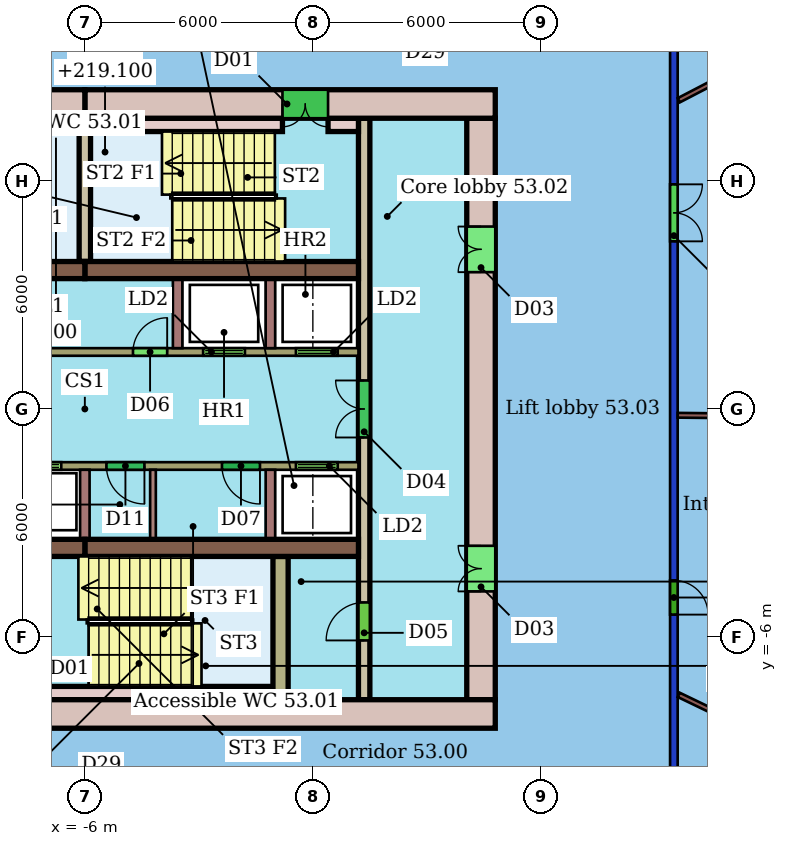
"""IFC4 building model, lengths in metres.
Left out: names, types, materials, properties, quantities, classifications, styles, units other than length and angle.
Written with IfcOpenShell. Run it as: python <this file> out.ifc"""

import sys

from ifc_helpers import new_model, si_unit, direction, frame, frame_2d, origin, place, context, subcontext, project, spatial, rectangle, extrude, element, fill, save


model = new_model("IFC4")
c1 = context("Model", 3, precision=1e-05, world=origin(), true_north=direction((0.0, 1.0)))
c2 = subcontext(c1, "Body", "Model", "MODEL_VIEW")
j1 = project(units=[si_unit("LENGTHUNIT", "METRE"), si_unit("PLANEANGLEUNIT", "RADIAN")], contexts=[c1])
p1 = place(None, origin())
s1 = spatial("IfcSite", under=j1, at=p1, CompositionType="ELEMENT")
p2 = place(p1, origin())
s2 = spatial("IfcBuilding", under=s1, at=p2, CompositionType="ELEMENT")
p3 = place(p2, frame((0.0, 0.0, 217.3)))
s3 = spatial("IfcBuildingStorey", under=s2, at=p3, CompositionType="ELEMENT", Elevation=217.3)
p4 = place(p3, frame((9.5, 10.4, 0.0), z_axis=(0.0, 0.0, 1.0), x_axis=(0.0, -1.0, 0.0)))
e1 = element("IfcWall", 1, at=p4, inside=s3, PredefinedType="PARTITIONING", context=c2, shape_type="SweptSolid", body=[
    extrude(rectangle(XDim=20.8, YDim=0.2, at=frame_2d((10.4, 0.0))), origin(), (0.0, 0.0, 1.0), 3.05),
])
p5 = place(p4, frame((14.911, 0.0, 0.0)))
e2 = element("IfcOpeningElement", 2, at=p5, cuts=e1, PredefinedType="OPENING", context=c2, shape_type="SweptSolid", body=[
    extrude(rectangle(XDim=0.9, YDim=2.1, at=frame_2d((0.45, 1.05))), frame((0.0, 0.11, 0.0), z_axis=(0.0, -1.0, 0.0), x_axis=(1.0, 0.0, 0.0)), (0.0, 0.0, 1.0), 0.22),
])
p6 = place(p4, frame((4.489, 0.0, 0.0)))
e3 = element("IfcOpeningElement", 3, at=p6, cuts=e1, PredefinedType="OPENING", context=c2, shape_type="SweptSolid", body=[
    extrude(rectangle(XDim=1.5, YDim=2.1, at=frame_2d((0.75, 1.05))), frame((0.0, 0.11, 0.0), z_axis=(0.0, -1.0, 0.0), x_axis=(1.0, 0.0, 0.0)), (0.0, 0.0, 1.0), 0.22),
])
p7 = place(p3, frame((14.057, -9.655, 0.0), z_axis=(0.0, 0.0, 1.0), x_axis=(-0.901030422523, 0.433755896431, 0.0)))
e4 = element("IfcWall", 4, at=p7, inside=s3, PredefinedType="PARTITIONING", context=c2, shape_type="SweptSolid", body=[
    extrude(rectangle(XDim=4.917, YDim=0.125, at=frame_2d((2.458, 0.0))), origin(), (0.0, 0.0, 1.0), 3.45),
])
p8 = place(p3, frame((17.84, -0.253, 0.0), z_axis=(0.0, 0.0, 1.0), x_axis=(-0.999943746201, 0.0106068107, 0.0)))
e5 = element("IfcWall", 5, at=p8, inside=s3, PredefinedType="PARTITIONING", context=c2, shape_type="SweptSolid", body=[
    extrude(rectangle(XDim=8.24, YDim=0.125, at=frame_2d((4.12, 0.0))), origin(), (0.0, 0.0, 1.0), 3.45),
])
p9 = place(p3, frame((17.207, 12.061, 0.0), z_axis=(0.0, 0.0, 1.0), x_axis=(-0.887319286248, -0.461155596574, 0.0)))
e6 = element("IfcWall", 6, at=p9, inside=s3, PredefinedType="PARTITIONING", context=c2, shape_type="SweptSolid", body=[
    extrude(rectangle(XDim=8.54, YDim=0.125, at=frame_2d((4.27, 0.0))), origin(), (0.0, 0.0, 1.0), 3.45),
])
p10 = place(p3, frame((4.8, 8.025, 0.0), z_axis=(0.0, 0.0, 1.0), x_axis=(-1.0, 0.0, 0.0)))
e7 = element("IfcWall", 7, at=p10, inside=s3, PredefinedType="SHEAR", context=c2, shape_type="SweptSolid", body=[
    extrude(rectangle(XDim=10.8, YDim=0.75, at=frame_2d((5.4, 0.0))), origin(), (0.0, 0.0, 1.0), 3.3),
])
p11 = place(p10, frame((4.4, 0.0, 0.0)))
e8 = element("IfcOpeningElement", 8, at=p11, cuts=e7, PredefinedType="OPENING", context=c2, shape_type="SweptSolid", body=[
    extrude(rectangle(XDim=1.2, YDim=2.1, at=frame_2d((0.6, 1.05))), frame((0.0, 0.385, 0.0), z_axis=(0.0, -1.0, 0.0), x_axis=(1.0, 0.0, 0.0)), (0.0, 0.0, 1.0), 0.77),
])
p12 = place(p3, frame((-6.0, 8.025, 0.0), z_axis=(0.0, 0.0, 1.0), x_axis=(-1.0, 0.0, 0.0)))
e9 = element("IfcWall", 9, at=p12, inside=s3, PredefinedType="SHEAR", context=c2, shape_type="SweptSolid", body=[
    extrude(rectangle(XDim=10.8, YDim=0.75, at=frame_2d((5.4, 0.0))), origin(), (0.0, 0.0, 1.0), 3.3),
])
p13 = place(p12, frame((5.2, 0.0, 0.0)))
e10 = element("IfcOpeningElement", 10, at=p13, cuts=e9, PredefinedType="OPENING", context=c2, shape_type="SweptSolid", body=[
    extrude(rectangle(XDim=1.2, YDim=2.1, at=frame_2d((0.6, 1.05))), frame((0.0, 0.385, 0.0), z_axis=(0.0, -1.0, 0.0), x_axis=(1.0, 0.0, 0.0)), (0.0, 0.0, 1.0), 0.77),
])
p14 = place(p3, frame((-16.8, -8.025, 0.0), z_axis=(0.0, 0.0, 1.0), x_axis=(1.0, 0.0, 0.0)))
e11 = element("IfcWall", 11, at=p14, inside=s3, PredefinedType="SHEAR", context=c2, shape_type="SweptSolid", body=[
    extrude(rectangle(XDim=21.6, YDim=0.75, at=frame_2d((10.8, 0.0))), origin(), (0.0, 0.0, 1.0), 3.3),
])
p15 = place(p14, frame((4.8, 0.0, 0.0)))
e12 = element("IfcOpeningElement", 12, at=p15, cuts=e11, PredefinedType="OPENING", context=c2, shape_type="SweptSolid", body=[
    extrude(rectangle(XDim=1.2, YDim=2.1, at=frame_2d((0.6, 1.05))), frame((0.0, 0.385, 0.0), z_axis=(0.0, -1.0, 0.0), x_axis=(1.0, 0.0, 0.0)), (0.0, 0.0, 1.0), 0.77),
])
p16 = place(p3, frame((4.425, -7.65, 0.0), z_axis=(0.0, 0.0, 1.0), x_axis=(0.0, 1.0, 0.0)))
e13 = element("IfcWall", 13, at=p16, inside=s3, PredefinedType="SHEAR", context=c2, shape_type="SweptSolid", body=[
    extrude(rectangle(XDim=15.3, YDim=0.75, at=frame_2d((7.65, 0.0))), origin(), (0.0, 0.0, 1.0), 3.3),
])
p17 = place(p16, frame((2.85, 0.0, 0.0)))
e14 = element("IfcOpeningElement", 14, at=p17, cuts=e13, PredefinedType="OPENING", context=c2, shape_type="SweptSolid", body=[
    extrude(rectangle(XDim=1.2, YDim=2.1, at=frame_2d((0.6, 1.05))), frame((0.0, 0.385, 0.0), z_axis=(0.0, -1.0, 0.0), x_axis=(1.0, 0.0, 0.0)), (0.0, 0.0, 1.0), 0.77),
])
p18 = place(p16, frame((11.25, 0.0, 0.0)))
e15 = element("IfcOpeningElement", 15, at=p18, cuts=e13, PredefinedType="OPENING", context=c2, shape_type="SweptSolid", body=[
    extrude(rectangle(XDim=1.2, YDim=2.1, at=frame_2d((0.6, 1.05))), frame((0.0, 0.385, 0.0), z_axis=(0.0, -1.0, 0.0), x_axis=(1.0, 0.0, 0.0)), (0.0, 0.0, 1.0), 0.77),
])
for number, where, z_axis, x_axis in (
    (16, (-13.2, 3.655, 0.0), (0.0, 0.0, 1.0), (1.0, 0.0, 0.0)),
    (17, (-6.0, 3.655, 0.0), (0.0, 0.0, 1.0), (1.0, 0.0, 0.0)),
):
    element("IfcWall", number, at=place(p3, frame(where, z_axis=z_axis, x_axis=x_axis)), inside=s3, PredefinedType="SHEAR", context=c2, shape_type="SweptSolid", body=[
        extrude(rectangle(XDim=7.2, YDim=0.45, at=frame_2d((3.6, 0.0))), origin(), (0.0, 0.0, 1.0), 3.3),
    ])
p19 = place(p3, frame((-13.2, -3.655, 0.0), z_axis=(0.0, 0.0, 1.0), x_axis=(1.0, 0.0, 0.0)))
e18 = element("IfcWall", 18, at=p19, inside=s3, PredefinedType="SHEAR", context=c2, shape_type="SweptSolid", body=[
    extrude(rectangle(XDim=7.2, YDim=0.45, at=frame_2d((3.6, 0.0))), origin(), (0.0, 0.0, 1.0), 3.3),
])
p20 = place(p19, frame((0.496, 0.0, 0.0)))
e19 = element("IfcOpeningElement", 19, at=p20, cuts=e18, PredefinedType="OPENING", context=c2, shape_type="SweptSolid", body=[
    extrude(rectangle(XDim=1.2, YDim=2.1, at=frame_2d((0.6, 1.05))), frame((0.0, 0.235, 0.0), z_axis=(0.0, -1.0, 0.0), x_axis=(1.0, 0.0, 0.0)), (0.0, 0.0, 1.0), 0.47),
])
p21 = place(p19, frame((2.938, 0.0, 0.0)))
e20 = element("IfcOpeningElement", 20, at=p21, cuts=e18, PredefinedType="OPENING", context=c2, shape_type="SweptSolid", body=[
    extrude(rectangle(XDim=1.2, YDim=2.1, at=frame_2d((0.6, 1.05))), frame((0.0, 0.235, 0.0), z_axis=(0.0, -1.0, 0.0), x_axis=(1.0, 0.0, 0.0)), (0.0, 0.0, 1.0), 0.47),
])
p22 = place(p3, frame((-6.0, -3.655, 0.0), z_axis=(0.0, 0.0, 1.0), x_axis=(1.0, 0.0, 0.0)))
e21 = element("IfcWall", 21, at=p22, inside=s3, PredefinedType="SHEAR", context=c2, shape_type="SweptSolid", body=[
    extrude(rectangle(XDim=7.2, YDim=0.45, at=frame_2d((3.6, 0.0))), origin(), (0.0, 0.0, 1.0), 3.3),
])
p23 = place(p3, frame((1.35, -7.65, 0.0), z_axis=(0.0, 0.0, 1.0), x_axis=(0.0, 1.0, 0.0)))
e22 = element("IfcWall", 22, at=p23, inside=s3, PredefinedType="SHEAR", context=c2, shape_type="SweptSolid", body=[
    extrude(rectangle(XDim=15.3, YDim=0.3, at=frame_2d((7.65, 0.0))), origin(), (0.0, 0.0, 1.0), 3.3),
])
p24 = place(p23, frame((1.56, 0.0, 0.0)))
e23 = element("IfcOpeningElement", 23, at=p24, cuts=e22, PredefinedType="OPENING", context=c2, shape_type="SweptSolid", body=[
    extrude(rectangle(XDim=1.0, YDim=2.1, at=frame_2d((0.5, 1.05))), frame((0.0, 0.16, 0.0), z_axis=(0.0, -1.0, 0.0), x_axis=(1.0, 0.0, 0.0)), (0.0, 0.0, 1.0), 0.32),
])
p25 = place(p23, frame((6.9, 0.0, 0.0)))
e24 = element("IfcOpeningElement", 24, at=p25, cuts=e22, PredefinedType="OPENING", context=c2, shape_type="SweptSolid", body=[
    extrude(rectangle(XDim=1.5, YDim=2.1, at=frame_2d((0.75, 1.05))), frame((0.0, 0.16, 0.0), z_axis=(0.0, -1.0, 0.0), x_axis=(1.0, 0.0, 0.0)), (0.0, 0.0, 1.0), 0.32),
])
p26 = place(p3, frame((-13.2, 1.5, 0.0), z_axis=(0.0, 0.0, 1.0), x_axis=(1.0, 0.0, 0.0)))
e25 = element("IfcWall", 25, at=p26, inside=s3, PredefinedType="SHEAR", context=c2, shape_type="SweptSolid", body=[
    extrude(rectangle(XDim=14.4, YDim=0.2, at=frame_2d((7.2, 0.0))), origin(), (0.0, 0.0, 1.0), 3.3),
])
p27 = place(p26, frame((10.312, 0.0, 0.0)))
e26 = element("IfcOpeningElement", 26, at=p27, cuts=e25, PredefinedType="OPENING", context=c2, shape_type="SweptSolid", body=[
    extrude(rectangle(XDim=1.1, YDim=2.1, at=frame_2d((0.55, 1.05))), frame((0.0, 0.11, 0.0), z_axis=(0.0, -1.0, 0.0), x_axis=(1.0, 0.0, 0.0)), (0.0, 0.0, 1.0), 0.22),
])
p28 = place(p26, frame((12.754, 0.0, 0.0)))
e27 = element("IfcOpeningElement", 27, at=p28, cuts=e25, PredefinedType="OPENING", context=c2, shape_type="SweptSolid", body=[
    extrude(rectangle(XDim=1.1, YDim=2.1, at=frame_2d((0.55, 1.05))), frame((0.0, 0.11, 0.0), z_axis=(0.0, -1.0, 0.0), x_axis=(1.0, 0.0, 0.0)), (0.0, 0.0, 1.0), 0.22),
])
p29 = place(p26, frame((0.15, 0.0, 0.0)))
e28 = element("IfcOpeningElement", 28, at=p29, cuts=e25, PredefinedType="OPENING", context=c2, shape_type="SweptSolid", body=[
    extrude(rectangle(XDim=1.0, YDim=2.1, at=frame_2d((0.5, 1.05))), frame((0.0, 0.11, 0.0), z_axis=(0.0, -1.0, 0.0), x_axis=(1.0, 0.0, 0.0)), (0.0, 0.0, 1.0), 0.22),
])
p30 = place(p26, frame((2.794, 0.0, 0.0)))
e29 = element("IfcOpeningElement", 29, at=p30, cuts=e25, PredefinedType="OPENING", context=c2, shape_type="SweptSolid", body=[
    extrude(rectangle(XDim=0.9, YDim=2.1, at=frame_2d((0.45, 1.05))), frame((0.0, 0.11, 0.0), z_axis=(0.0, -1.0, 0.0), x_axis=(1.0, 0.0, 0.0)), (0.0, 0.0, 1.0), 0.22),
])
p31 = place(p26, frame((8.467, 0.0, 0.0)))
e30 = element("IfcOpeningElement", 30, at=p31, cuts=e25, PredefinedType="OPENING", context=c2, shape_type="SweptSolid", body=[
    extrude(rectangle(XDim=0.9, YDim=2.1, at=frame_2d((0.45, 1.05))), frame((0.0, 0.11, 0.0), z_axis=(0.0, -1.0, 0.0), x_axis=(1.0, 0.0, 0.0)), (0.0, 0.0, 1.0), 0.22),
])
p32 = place(p3, frame((1.2, -1.5, 0.0), z_axis=(0.0, 0.0, 1.0), x_axis=(-1.0, 0.0, 0.0)))
e31 = element("IfcWall", 31, at=p32, inside=s3, PredefinedType="SHEAR", context=c2, shape_type="SweptSolid", body=[
    extrude(rectangle(XDim=14.4, YDim=0.2, at=frame_2d((7.2, 0.0))), origin(), (0.0, 0.0, 1.0), 3.3),
])
p33 = place(p32, frame((7.821, 0.0, 0.0)))
e32 = element("IfcOpeningElement", 32, at=p33, cuts=e31, PredefinedType="OPENING", context=c2, shape_type="SweptSolid", body=[
    extrude(rectangle(XDim=1.2, YDim=2.1, at=frame_2d((0.6, 1.05))), frame((0.0, 0.11, 0.0), z_axis=(0.0, -1.0, 0.0), x_axis=(1.0, 0.0, 0.0)), (0.0, 0.0, 1.0), 0.22),
])
p34 = place(p32, frame((0.546, 0.0, 0.0)))
e33 = element("IfcOpeningElement", 33, at=p34, cuts=e31, PredefinedType="OPENING", context=c2, shape_type="SweptSolid", body=[
    extrude(rectangle(XDim=1.1, YDim=2.1, at=frame_2d((0.55, 1.05))), frame((0.0, 0.11, 0.0), z_axis=(0.0, -1.0, 0.0), x_axis=(1.0, 0.0, 0.0)), (0.0, 0.0, 1.0), 0.22),
])
p35 = place(p32, frame((5.632, 0.0, 0.0)))
e34 = element("IfcOpeningElement", 34, at=p35, cuts=e31, PredefinedType="OPENING", context=c2, shape_type="SweptSolid", body=[
    extrude(rectangle(XDim=1.0, YDim=2.1, at=frame_2d((0.5, 1.05))), frame((0.0, 0.11, 0.0), z_axis=(0.0, -1.0, 0.0), x_axis=(1.0, 0.0, 0.0)), (0.0, 0.0, 1.0), 0.22),
])
p36 = place(p32, frame((2.592, 0.0, 0.0)))
e35 = element("IfcOpeningElement", 35, at=p36, cuts=e31, PredefinedType="OPENING", context=c2, shape_type="SweptSolid", body=[
    extrude(rectangle(XDim=1.0, YDim=2.1, at=frame_2d((0.5, 1.05))), frame((0.0, 0.11, 0.0), z_axis=(0.0, -1.0, 0.0), x_axis=(1.0, 0.0, 0.0)), (0.0, 0.0, 1.0), 0.22),
])
p37 = place(p3, frame((-0.85, -3.88, 0.0), z_axis=(0.0, 0.0, 1.0), x_axis=(0.0, -1.0, 0.0)))
e36 = element("IfcWall", 36, at=p37, inside=s3, PredefinedType="SHEAR", context=c2, shape_type="SweptSolid", body=[
    extrude(rectangle(XDim=3.77, YDim=0.4, at=frame_2d((1.885, 0.0))), origin(), (0.0, 0.0, 1.0), 3.3),
])
p38 = place(p3, frame((-6.0, 3.88, 0.0), z_axis=(0.0, 0.0, 1.0), x_axis=(0.0, 1.0, 0.0)))
e37 = element("IfcWall", 37, at=p38, inside=s3, PredefinedType="SHEAR", context=c2, shape_type="SweptSolid", body=[
    extrude(rectangle(XDim=3.77, YDim=0.3, at=frame_2d((1.885, 0.0))), origin(), (0.0, 0.0, 1.0), 3.3),
])
for number, where, z_axis, x_axis in (
    (38, (-11.2, 7.475, 0.0), (0.0, 0.0, 1.0), (1.0, 0.0, 0.0)),
    (39, (-5.85, 7.475, 0.0), (0.0, 0.0, 1.0), (1.0, 0.0, 0.0)),
):
    element("IfcWall", number, at=place(p3, frame(where, z_axis=z_axis, x_axis=x_axis)), inside=s3, PredefinedType="SHEAR", context=c2, shape_type="SweptSolid", body=[
        extrude(rectangle(XDim=5.05, YDim=0.35, at=frame_2d((2.525, 0.0))), origin(), (0.0, 0.0, 1.0), 3.3),
    ])
p39 = place(p3, frame((0.4, 7.475, 0.0), z_axis=(0.0, 0.0, 1.0), x_axis=(1.0, 0.0, 0.0)))
e40 = element("IfcWall", 40, at=p39, inside=s3, PredefinedType="SHEAR", context=c2, shape_type="SweptSolid", body=[
    extrude(rectangle(XDim=0.8, YDim=0.35, at=frame_2d((0.4, 0.0))), origin(), (0.0, 0.0, 1.0), 3.3),
])
p40 = place(p3, frame((-8.1, -7.475, 0.0), z_axis=(0.0, 0.0, 1.0), x_axis=(1.0, 0.0, 0.0)))
e41 = element("IfcWall", 41, at=p40, inside=s3, PredefinedType="SHEAR", context=c2, shape_type="SweptSolid", body=[
    extrude(rectangle(XDim=7.05, YDim=0.35, at=frame_2d((3.525, 0.0))), origin(), (0.0, 0.0, 1.0), 3.3),
])
for number, where, z_axis, x_axis in (
    (42, (-3.558, 1.6, 0.0), (0.0, 0.0, 1.0), (0.0, 1.0, 0.0)),
    (43, (-1.117, 1.6, 0.0), (0.0, 0.0, 1.0), (0.0, 1.0, 0.0)),
    (44, (-6.0, -1.6, 0.0), (0.0, 0.0, 1.0), (0.0, -1.0, 0.0)),
    (45, (-1.117, -1.6, 0.0), (0.0, 0.0, 1.0), (0.0, -1.0, 0.0)),
):
    element("IfcWall", number, at=place(p3, frame(where, z_axis=z_axis, x_axis=x_axis)), inside=s3, PredefinedType="SHEAR", context=c2, shape_type="SweptSolid", body=[
        extrude(rectangle(XDim=1.83, YDim=0.25, at=frame_2d((0.915, 0.0))), origin(), (0.0, 0.0, 1.0), 3.3),
    ])
p41 = place(p3, frame((-4.207, -1.6, 0.0), z_axis=(0.0, 0.0, 1.0), x_axis=(0.0, -1.0, 0.0)))
e46 = element("IfcWall", 46, at=p41, inside=s3, PredefinedType="PARTITIONING", context=c2, shape_type="SweptSolid", body=[
    extrude(rectangle(XDim=1.83, YDim=0.15, at=frame_2d((0.915, 0.0))), origin(), (0.0, 0.0, 1.0), 3.3),
])
p42 = place(p5, origin())
e47 = element("IfcDoor", 47, at=p42, inside=s3, OperationType="SINGLE_SWING_RIGHT", PredefinedType="DOOR", context=c2, shape_type="SweptSolid", body=[
    extrude(rectangle(XDim=0.9, YDim=2.1, at=frame_2d((0.45, 1.05))), frame((0.0, 0.025, 0.0), z_axis=(0.0, -1.0, 0.0), x_axis=(1.0, 0.0, 0.0)), (0.0, 0.0, 1.0), 0.05),
])
fill(e2, e47)
p43 = place(p6, origin())
e48 = element("IfcDoor", 48, at=p43, inside=s3, OperationType="DOUBLE_DOOR_SINGLE_SWING", PredefinedType="DOOR", context=c2, shape_type="SweptSolid", body=[
    extrude(rectangle(XDim=1.5, YDim=2.1, at=frame_2d((0.75, 1.05))), frame((0.0, 0.025, 0.0), z_axis=(0.0, -1.0, 0.0), x_axis=(1.0, 0.0, 0.0)), (0.0, 0.0, 1.0), 0.05),
])
fill(e3, e48)
p44 = place(p11, origin())
e49 = element("IfcDoor", 49, at=p44, inside=s3, OperationType="DOUBLE_DOOR_SINGLE_SWING", PredefinedType="NOTDEFINED", context=c2, shape_type="SweptSolid", body=[
    extrude(rectangle(XDim=1.2, YDim=2.1, at=frame_2d((0.6, 1.05))), frame((0.0, 0.025, 0.0), z_axis=(0.0, -1.0, 0.0), x_axis=(1.0, 0.0, 0.0)), (0.0, 0.0, 1.0), 0.05),
])
fill(e8, e49)
p45 = place(p17, origin())
e50 = element("IfcDoor", 50, at=p45, inside=s3, OperationType="DOUBLE_DOOR_SINGLE_SWING", PredefinedType="NOTDEFINED", context=c2, shape_type="SweptSolid", body=[
    extrude(rectangle(XDim=1.2, YDim=2.1, at=frame_2d((0.6, 1.05))), frame((0.0, 0.025, 0.0), z_axis=(0.0, -1.0, 0.0), x_axis=(1.0, 0.0, 0.0)), (0.0, 0.0, 1.0), 0.05),
])
fill(e14, e50)
p46 = place(p18, origin())
e51 = element("IfcDoor", 51, at=p46, inside=s3, OperationType="DOUBLE_DOOR_SINGLE_SWING", PredefinedType="NOTDEFINED", context=c2, shape_type="SweptSolid", body=[
    extrude(rectangle(XDim=1.2, YDim=2.1, at=frame_2d((0.6, 1.05))), frame((0.0, 0.025, 0.0), z_axis=(0.0, -1.0, 0.0), x_axis=(1.0, 0.0, 0.0)), (0.0, 0.0, 1.0), 0.05),
])
fill(e15, e51)
p47 = place(p24, origin())
e52 = element("IfcDoor", 52, at=p47, inside=s3, OperationType="SINGLE_SWING_LEFT", PredefinedType="NOTDEFINED", context=c2, shape_type="SweptSolid", body=[
    extrude(rectangle(XDim=1.0, YDim=2.1, at=frame_2d((0.5, 1.05))), frame((0.0, 0.025, 0.0), z_axis=(0.0, -1.0, 0.0), x_axis=(1.0, 0.0, 0.0)), (0.0, 0.0, 1.0), 0.05),
])
fill(e23, e52)
p48 = place(p25, origin())
e53 = element("IfcDoor", 53, at=p48, inside=s3, OperationType="DOUBLE_DOOR_SINGLE_SWING", PredefinedType="NOTDEFINED", context=c2, shape_type="SweptSolid", body=[
    extrude(rectangle(XDim=1.5, YDim=2.1, at=frame_2d((0.75, 1.05))), frame((0.0, 0.025, 0.0), z_axis=(0.0, -1.0, 0.0), x_axis=(1.0, 0.0, 0.0)), (0.0, 0.0, 1.0), 0.05),
])
fill(e24, e53)
p49 = place(p27, origin())
e54 = element("IfcDoor", 54, at=p49, inside=s3, OperationType="DOUBLE_DOOR_SLIDING", PredefinedType="NOTDEFINED", context=c2, shape_type="SweptSolid", body=[
    extrude(rectangle(XDim=1.1, YDim=2.1, at=frame_2d((0.55, 1.05))), frame((0.0, 0.025, 0.0), z_axis=(0.0, -1.0, 0.0), x_axis=(1.0, 0.0, 0.0)), (0.0, 0.0, 1.0), 0.05),
])
fill(e26, e54)
p50 = place(p28, origin())
e55 = element("IfcDoor", 55, at=p50, inside=s3, OperationType="DOUBLE_DOOR_SLIDING", PredefinedType="NOTDEFINED", context=c2, shape_type="SweptSolid", body=[
    extrude(rectangle(XDim=1.1, YDim=2.1, at=frame_2d((0.55, 1.05))), frame((0.0, 0.025, 0.0), z_axis=(0.0, -1.0, 0.0), x_axis=(1.0, 0.0, 0.0)), (0.0, 0.0, 1.0), 0.05),
])
fill(e27, e55)
p51 = place(p31, origin())
e56 = element("IfcDoor", 56, at=p51, inside=s3, OperationType="SINGLE_SWING_RIGHT", PredefinedType="NOTDEFINED", context=c2, shape_type="SweptSolid", body=[
    extrude(rectangle(XDim=0.9, YDim=2.1, at=frame_2d((0.45, 1.05))), frame((0.0, 0.025, 0.0), z_axis=(0.0, -1.0, 0.0), x_axis=(1.0, 0.0, 0.0)), (0.0, 0.0, 1.0), 0.05),
])
fill(e30, e56)
p52 = place(p33, origin())
e57 = element("IfcDoor", 57, at=p52, inside=s3, OperationType="DOUBLE_DOOR_SLIDING", PredefinedType="NOTDEFINED", context=c2, shape_type="SweptSolid", body=[
    extrude(rectangle(XDim=1.2, YDim=2.1, at=frame_2d((0.6, 1.05))), frame((0.0, 0.025, 0.0), z_axis=(0.0, -1.0, 0.0), x_axis=(1.0, 0.0, 0.0)), (0.0, 0.0, 1.0), 0.05),
])
fill(e32, e57)
p53 = place(p34, origin())
e58 = element("IfcDoor", 58, at=p53, inside=s3, OperationType="DOUBLE_DOOR_SLIDING", PredefinedType="NOTDEFINED", context=c2, shape_type="SweptSolid", body=[
    extrude(rectangle(XDim=1.1, YDim=2.1, at=frame_2d((0.55, 1.05))), frame((0.0, 0.025, 0.0), z_axis=(0.0, -1.0, 0.0), x_axis=(1.0, 0.0, 0.0)), (0.0, 0.0, 1.0), 0.05),
])
fill(e33, e58)
p54 = place(p35, origin())
e59 = element("IfcDoor", 59, at=p54, inside=s3, OperationType="SINGLE_SWING_LEFT", PredefinedType="NOTDEFINED", context=c2, shape_type="SweptSolid", body=[
    extrude(rectangle(XDim=1.0, YDim=2.1, at=frame_2d((0.5, 1.05))), frame((0.0, 0.025, 0.0), z_axis=(0.0, -1.0, 0.0), x_axis=(1.0, 0.0, 0.0)), (0.0, 0.0, 1.0), 0.05),
])
fill(e34, e59)
p55 = place(p36, origin())
e60 = element("IfcDoor", 60, at=p55, inside=s3, OperationType="SINGLE_SWING_LEFT", PredefinedType="NOTDEFINED", context=c2, shape_type="SweptSolid", body=[
    extrude(rectangle(XDim=1.0, YDim=2.1, at=frame_2d((0.5, 1.05))), frame((0.0, 0.025, 0.0), z_axis=(0.0, -1.0, 0.0), x_axis=(1.0, 0.0, 0.0)), (0.0, 0.0, 1.0), 0.05),
])
fill(e35, e60)
save(model, sys.argv[1])
